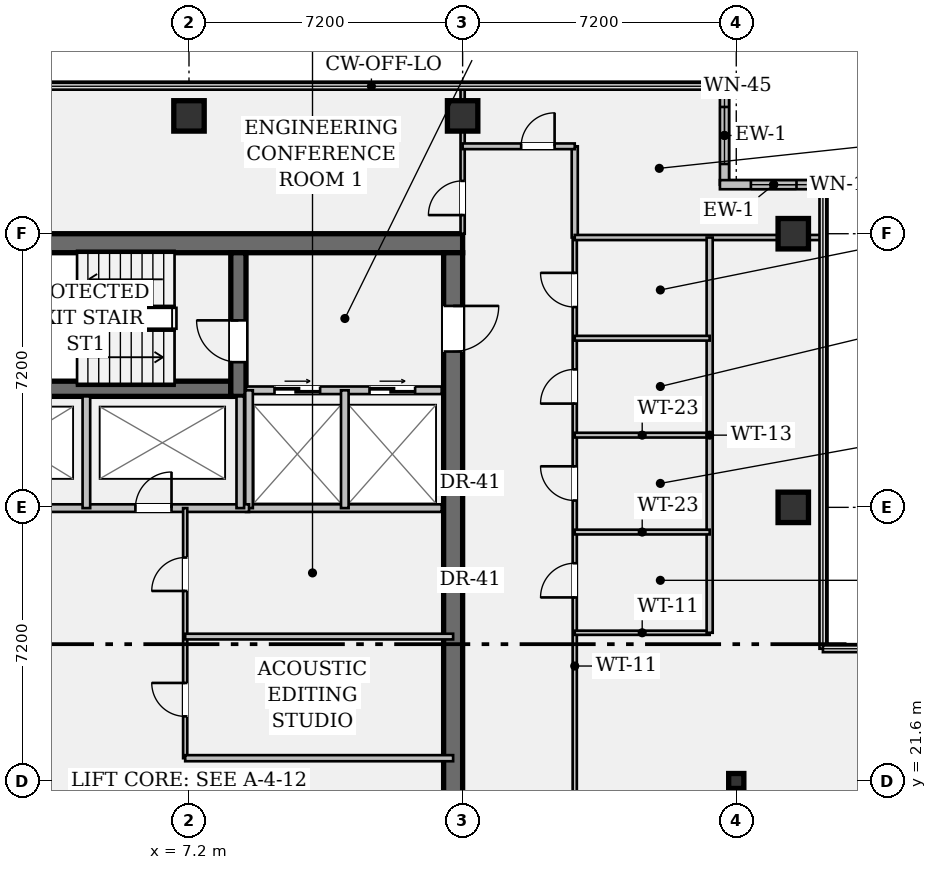
"""IFC4 building model, lengths in metres.
Left out: names, types, materials, properties, quantities, classifications, styles, units other than length and angle.
Written with IfcOpenShell. Run it as: python <this file> out.ifc"""

import sys

from ifc_helpers import new_model, si_unit, direction, frame, frame_2d, origin, origin_2d, place, context, subcontext, project, spatial, rectangle, hollow_rectangle, i_section, extrude, element, fill, save


model = new_model("IFC4")
c1 = context("Model", 3, precision=1e-05, world=origin(), true_north=direction((0.0, 1.0)))
c2 = subcontext(c1, "Body", "Model", "MODEL_VIEW")
j1 = project(units=[si_unit("LENGTHUNIT", "METRE"), si_unit("PLANEANGLEUNIT", "RADIAN")], contexts=[c1])
p1 = place(None, origin())
s1 = spatial("IfcSite", under=j1, at=p1, CompositionType="ELEMENT")
p2 = place(p1, origin())
s2 = spatial("IfcBuilding", under=s1, at=p2, CompositionType="ELEMENT")
p3 = place(p2, frame((0.0, 0.0, 197.75)))
s3 = spatial("IfcBuildingStorey", under=s2, at=p3, CompositionType="ELEMENT", Elevation=197.75)
p4 = place(p3, frame((0.5, 35.75, 0.0), z_axis=(0.0, 0.0, 1.0), x_axis=(1.0, 0.0, 0.0)))
e1 = element("IfcWall", 1, at=p4, inside=s3, PredefinedType="SHEAR", context=c2, shape_type="SweptSolid", body=[
    extrude(rectangle(XDim=13.9, YDim=0.5, at=frame_2d((6.95, 0.0))), origin(), (0.0, 0.0, 1.0), 3.24),
])
p5 = place(p3, frame((14.15, 35.5, 0.0), z_axis=(0.0, 0.0, 1.0), x_axis=(0.0, -1.0, 0.0)))
e2 = element("IfcWall", 2, at=p5, inside=s3, PredefinedType="SHEAR", context=c2, shape_type="SweptSolid", body=[
    extrude(rectangle(XDim=27.8, YDim=0.5, at=frame_2d((13.9, 0.0))), origin(), (0.0, 0.0, 1.0), 3.24),
])
p6 = place(p5, frame((1.4, 0.0, 0.0)))
e3 = element("IfcOpeningElement", 3, at=p6, cuts=e2, PredefinedType="OPENING", context=c2, shape_type="SweptSolid", body=[
    extrude(rectangle(XDim=1.2, YDim=2.15, at=frame_2d((0.6, 1.075))), frame((0.0, 0.262, 0.0), z_axis=(0.0, -1.0, 0.0), x_axis=(1.0, 0.0, 0.0)), (0.0, 0.0, 1.0), 0.524),
])
p7 = place(p5, frame((25.35, 0.0, 0.0)))
e4 = element("IfcOpeningElement", 4, at=p7, cuts=e2, PredefinedType="OPENING", context=c2, shape_type="SweptSolid", body=[
    extrude(rectangle(XDim=1.2, YDim=2.15, at=frame_2d((0.6, 1.075))), frame((0.0, 0.262, 0.0), z_axis=(0.0, -1.0, 0.0), x_axis=(1.0, 0.0, 0.0)), (0.0, 0.0, 1.0), 0.524),
])
p8 = place(p5, frame((14.7, 0.0, 0.0)))
e5 = element("IfcOpeningElement", 5, at=p8, cuts=e2, PredefinedType="OPENING", context=c2, shape_type="SweptSolid", body=[
    extrude(rectangle(XDim=1.6, YDim=2.2, at=frame_2d((0.8, 1.1))), frame((0.0, 0.262, 0.0), z_axis=(0.0, -1.0, 0.0), x_axis=(1.0, 0.0, 0.0)), (0.0, 0.0, 1.0), 0.524),
])
p9 = place(p3, frame((0.5, 31.92, 0.0), z_axis=(0.0, 0.0, 1.0), x_axis=(1.0, 0.0, 0.0)))
e6 = element("IfcWall", 6, at=p9, inside=s3, PredefinedType="SHEAR", context=c2, shape_type="SweptSolid", body=[
    extrude(rectangle(XDim=7.8, YDim=0.4, at=frame_2d((3.9, 0.0))), origin(), (0.0, 0.0, 1.0), 3.24),
])
p10 = place(p3, frame((8.5, 31.72, 0.0), z_axis=(0.0, 0.0, 1.0), x_axis=(0.0, 1.0, 0.0)))
e7 = element("IfcWall", 7, at=p10, inside=s3, PredefinedType="SHEAR", context=c2, shape_type="SweptSolid", body=[
    extrude(rectangle(XDim=3.78, YDim=0.4, at=frame_2d((1.89, 0.0))), origin(), (0.0, 0.0, 1.0), 3.24),
])
p11 = place(p10, frame((0.9, 0.0, 0.0)))
e8 = element("IfcOpeningElement", 8, at=p11, cuts=e7, PredefinedType="OPENING", context=c2, shape_type="SweptSolid", body=[
    extrude(rectangle(XDim=1.1, YDim=2.15, at=frame_2d((0.55, 1.075))), frame((0.0, 0.212, 0.0), z_axis=(0.0, -1.0, 0.0), x_axis=(1.0, 0.0, 0.0)), (0.0, 0.0, 1.0), 0.424),
])
for number, where, z_axis, x_axis in (
    (9, (7.2, 39.1, 0.0), (0.0, 0.0, 1.0), (1.0, 0.0, 0.0)),
    (10, (14.4, 39.1, 0.0), (0.0, 0.0, 1.0), (1.0, 0.0, 0.0)),
):
    element("IfcColumn", number, at=place(p3, frame(where, z_axis=z_axis, x_axis=x_axis)), inside=s3, PredefinedType="COLUMN", context=c2, shape_type="SweptSolid", body=[
        extrude(hollow_rectangle(XDim=0.8, YDim=0.8, WallThickness=0.05, at=origin_2d()), origin(), (0.0, 0.0, 1.0), 3.24),
    ])
p12 = place(p3, frame((21.6, 21.6, 0.0), z_axis=(0.0, 0.0, 1.0), x_axis=(1.0, 0.0, 0.0)))
e11 = element("IfcColumn", 11, at=p12, inside=s3, PredefinedType="COLUMN", context=c2, shape_type="SweptSolid", body=[
    extrude(i_section(OverallWidth=0.399, OverallDepth=0.394, WebThickness=0.023, FlangeThickness=0.037, FilletRadius=0.018, at=origin_2d()), origin(), (0.0, 0.0, 1.0), 3.24),
])
for number, where, z_axis, x_axis in (
    (12, (23.1, 28.8, 0.0), (0.0, 0.0, 1.0), (1.0, 0.0, 0.0)),
    (13, (23.1, 36.0, 0.0), (0.0, 0.0, 1.0), (1.0, 0.0, 0.0)),
):
    element("IfcColumn", number, at=place(p3, frame(where, z_axis=z_axis, x_axis=x_axis)), inside=s3, PredefinedType="COLUMN", context=c2, shape_type="SweptSolid", body=[
        extrude(hollow_rectangle(XDim=0.8, YDim=0.8, WallThickness=0.05, at=origin_2d()), origin(), (0.0, 0.0, 1.0), 3.24),
    ])
p13 = place(p3, frame((21.29, 39.88, 0.0), z_axis=(0.0, 0.0, 1.0), x_axis=(0.0, -1.0, 0.0)))
e14 = element("IfcWall", 14, at=p13, inside=s3, PredefinedType="STANDARD", context=c2, shape_type="SweptSolid", body=[
    extrude(rectangle(XDim=2.59, YDim=0.24, at=frame_2d((1.295, 0.0))), origin(), (0.0, 0.0, 1.0), 3.24),
])
p14 = place(p13, frame((0.545, 0.0, 0.95)))
e15 = element("IfcOpeningElement", 15, at=p14, cuts=e14, PredefinedType="OPENING", context=c2, shape_type="SweptSolid", body=[
    extrude(rectangle(XDim=1.5, YDim=1.8, at=frame_2d((0.75, 0.9))), frame((0.0, 0.132, 0.0), z_axis=(0.0, -1.0, 0.0), x_axis=(1.0, 0.0, 0.0)), (0.0, 0.0, 1.0), 0.264),
])
p15 = place(p3, frame((21.17, 37.29, 0.0), z_axis=(0.0, 0.0, 1.0), x_axis=(1.0, 0.0, 0.0)))
e16 = element("IfcWall", 16, at=p15, inside=s3, PredefinedType="STANDARD", context=c2, shape_type="SweptSolid", body=[
    extrude(rectangle(XDim=2.83, YDim=0.24, at=frame_2d((1.415, 0.0))), origin(), (0.0, 0.0, 1.0), 3.24),
])
p16 = place(p15, frame((0.815, 0.0, 0.95)))
e17 = element("IfcOpeningElement", 17, at=p16, cuts=e16, PredefinedType="OPENING", context=c2, shape_type="SweptSolid", body=[
    extrude(rectangle(XDim=1.2, YDim=1.8, at=frame_2d((0.6, 0.9))), frame((0.0, 0.132, 0.0), z_axis=(0.0, -1.0, 0.0), x_axis=(1.0, 0.0, 0.0)), (0.0, 0.0, 1.0), 0.264),
])
p17 = place(p3, frame((8.7, 31.88, 0.0), z_axis=(0.0, 0.0, 1.0), x_axis=(1.0, 0.0, 0.0)))
e18 = element("IfcWall", 18, at=p17, inside=s3, PredefinedType="PARTITIONING", context=c2, shape_type="SweptSolid", body=[
    extrude(rectangle(XDim=5.15, YDim=0.2, at=frame_2d((2.575, 0.0))), origin(), (0.0, 0.0, 1.0), 3.24),
])
p18 = place(p17, frame((0.75, 0.0, 0.0)))
e19 = element("IfcOpeningElement", 19, at=p18, cuts=e18, PredefinedType="OPENING", context=c2, shape_type="SweptSolid", body=[
    extrude(rectangle(XDim=1.2, YDim=2.2, at=frame_2d((0.6, 1.1))), frame((0.0, 0.112, 0.0), z_axis=(0.0, -1.0, 0.0), x_axis=(1.0, 0.0, 0.0)), (0.0, 0.0, 1.0), 0.224),
])
p19 = place(p17, frame((3.25, 0.0, 0.0)))
e20 = element("IfcOpeningElement", 20, at=p19, cuts=e18, PredefinedType="OPENING", context=c2, shape_type="SweptSolid", body=[
    extrude(rectangle(XDim=1.2, YDim=2.2, at=frame_2d((0.6, 1.1))), frame((0.0, 0.112, 0.0), z_axis=(0.0, -1.0, 0.0), x_axis=(1.0, 0.0, 0.0)), (0.0, 0.0, 1.0), 0.224),
])
p20 = place(p3, frame((8.7, 28.78, 0.0), z_axis=(0.0, 0.0, 1.0), x_axis=(1.0, 0.0, 0.0)))
e21 = element("IfcWall", 21, at=p20, inside=s3, PredefinedType="PARTITIONING", context=c2, shape_type="SweptSolid", body=[
    extrude(rectangle(XDim=5.15, YDim=0.2, at=frame_2d((2.575, 0.0))), origin(), (0.0, 0.0, 1.0), 3.24),
])
for number, where, z_axis, x_axis in (
    (22, (8.78, 28.78, 0.0), (0.0, 0.0, 1.0), (0.0, 1.0, 0.0)),
    (23, (11.3, 28.78, 0.0), (0.0, 0.0, 1.0), (0.0, 1.0, 0.0)),
):
    element("IfcWall", number, at=place(p3, frame(where, z_axis=z_axis, x_axis=x_axis)), inside=s3, PredefinedType="PARTITIONING", context=c2, shape_type="SweptSolid", body=[
        extrude(rectangle(XDim=3.1, YDim=0.2, at=frame_2d((1.55, 0.0))), origin(), (0.0, 0.0, 1.0), 3.24),
    ])
p21 = place(p3, frame((0.6, 28.78, 0.0), z_axis=(0.0, 0.0, 1.0), x_axis=(1.0, 0.0, 0.0)))
e24 = element("IfcWall", 24, at=p21, inside=s3, PredefinedType="PARTITIONING", context=c2, shape_type="SweptSolid", body=[
    extrude(rectangle(XDim=8.18, YDim=0.2, at=frame_2d((4.09, 0.0))), origin(), (0.0, 0.0, 1.0), 3.24),
])
p22 = place(p21, frame((1.21, 0.0, 0.0)))
e25 = element("IfcOpeningElement", 25, at=p22, cuts=e24, PredefinedType="OPENING", context=c2, shape_type="SweptSolid", body=[
    extrude(rectangle(XDim=0.95, YDim=2.15, at=frame_2d((0.475, 1.075))), frame((0.0, 0.112, 0.0), z_axis=(0.0, -1.0, 0.0), x_axis=(1.0, 0.0, 0.0)), (0.0, 0.0, 1.0), 0.224),
])
p23 = place(p21, frame((5.19, 0.0, 0.0)))
e26 = element("IfcOpeningElement", 26, at=p23, cuts=e24, PredefinedType="OPENING", context=c2, shape_type="SweptSolid", body=[
    extrude(rectangle(XDim=0.95, YDim=2.15, at=frame_2d((0.475, 1.075))), frame((0.0, 0.112, 0.0), z_axis=(0.0, -1.0, 0.0), x_axis=(1.0, 0.0, 0.0)), (0.0, 0.0, 1.0), 0.224),
])
for number, where, z_axis, x_axis in (
    (27, (4.5, 28.78, 0.0), (0.0, 0.0, 1.0), (0.0, 1.0, 0.0)),
    (28, (8.55, 28.78, 0.0), (0.0, 0.0, 1.0), (0.0, 1.0, 0.0)),
):
    element("IfcWall", number, at=place(p3, frame(where, z_axis=z_axis, x_axis=x_axis)), inside=s3, PredefinedType="PARTITIONING", context=c2, shape_type="SweptSolid", body=[
        extrude(rectangle(XDim=2.94, YDim=0.2, at=frame_2d((1.47, 0.0))), origin(), (0.0, 0.0, 1.0), 3.24),
    ])
p24 = place(p3, frame((7.1, 22.2, 0.0), z_axis=(0.0, 0.0, 1.0), x_axis=(0.0, 1.0, 0.0)))
e29 = element("IfcWall", 29, at=p24, inside=s3, PredefinedType="PARTITIONING", context=c2, shape_type="SweptSolid", body=[
    extrude(rectangle(XDim=6.58, YDim=0.11, at=frame_2d((3.29, 0.0))), origin(), (0.0, 0.0, 1.0), 3.24),
])
p25 = place(p24, frame((1.1, 0.0, 0.0)))
e30 = element("IfcOpeningElement", 30, at=p25, cuts=e29, PredefinedType="OPENING", context=c2, shape_type="SweptSolid", body=[
    extrude(rectangle(XDim=0.88, YDim=2.15, at=frame_2d((0.44, 1.075))), frame((0.0, 0.067, 0.0), z_axis=(0.0, -1.0, 0.0), x_axis=(1.0, 0.0, 0.0)), (0.0, 0.0, 1.0), 0.134),
])
p26 = place(p24, frame((4.4, 0.0, 0.0)))
e31 = element("IfcOpeningElement", 31, at=p26, cuts=e29, PredefinedType="OPENING", context=c2, shape_type="SweptSolid", body=[
    extrude(rectangle(XDim=0.88, YDim=2.15, at=frame_2d((0.44, 1.075))), frame((0.0, 0.067, 0.0), z_axis=(0.0, -1.0, 0.0), x_axis=(1.0, 0.0, 0.0)), (0.0, 0.0, 1.0), 0.134),
])
p27 = place(p3, frame((7.1, 22.2, 0.0), z_axis=(0.0, 0.0, 1.0), x_axis=(1.0, 0.0, 0.0)))
e32 = element("IfcWall", 32, at=p27, inside=s3, PredefinedType="PARTITIONING", context=c2, shape_type="SweptSolid", body=[
    extrude(rectangle(XDim=7.05, YDim=0.16, at=frame_2d((3.525, 0.0))), origin(), (0.0, 0.0, 1.0), 3.24),
])
p28 = place(p3, frame((7.1, 25.4, 0.0), z_axis=(0.0, 0.0, 1.0), x_axis=(1.0, 0.0, 0.0)))
e33 = element("IfcWall", 33, at=p28, inside=s3, PredefinedType="PARTITIONING", context=c2, shape_type="SweptSolid", body=[
    extrude(rectangle(XDim=7.05, YDim=0.15, at=frame_2d((3.525, 0.0))), origin(), (0.0, 0.0, 1.0), 3.24),
])
p29 = place(p3, frame((17.35, 13.35, 0.0), z_axis=(0.0, 0.0, 1.0), x_axis=(0.0, 1.0, 0.0)))
e34 = element("IfcWall", 34, at=p29, inside=s3, PredefinedType="PARTITIONING", context=c2, shape_type="SweptSolid", body=[
    extrude(rectangle(XDim=22.55, YDim=0.11, at=frame_2d((11.275, 0.0))), origin(), (0.0, 0.0, 1.0), 2.613),
])
p30 = place(p29, frame((13.08, 0.0, 0.0)))
e35 = element("IfcOpeningElement", 35, at=p30, cuts=e34, PredefinedType="OPENING", context=c2, shape_type="SweptSolid", body=[
    extrude(rectangle(XDim=0.9, YDim=2.15, at=frame_2d((0.45, 1.075))), frame((0.0, 0.067, 0.0), z_axis=(0.0, -1.0, 0.0), x_axis=(1.0, 0.0, 0.0)), (0.0, 0.0, 1.0), 0.134),
])
p31 = place(p29, frame((15.63, 0.0, 0.0)))
e36 = element("IfcOpeningElement", 36, at=p31, cuts=e34, PredefinedType="OPENING", context=c2, shape_type="SweptSolid", body=[
    extrude(rectangle(XDim=0.9, YDim=2.15, at=frame_2d((0.45, 1.075))), frame((0.0, 0.067, 0.0), z_axis=(0.0, -1.0, 0.0), x_axis=(1.0, 0.0, 0.0)), (0.0, 0.0, 1.0), 0.134),
])
p32 = place(p29, frame((18.18, 0.0, 0.0)))
e37 = element("IfcOpeningElement", 37, at=p32, cuts=e34, PredefinedType="OPENING", context=c2, shape_type="SweptSolid", body=[
    extrude(rectangle(XDim=0.9, YDim=2.15, at=frame_2d((0.45, 1.075))), frame((0.0, 0.067, 0.0), z_axis=(0.0, -1.0, 0.0), x_axis=(1.0, 0.0, 0.0)), (0.0, 0.0, 1.0), 0.134),
])
p33 = place(p29, frame((20.72, 0.0, 0.0)))
e38 = element("IfcOpeningElement", 38, at=p33, cuts=e34, PredefinedType="OPENING", context=c2, shape_type="SweptSolid", body=[
    extrude(rectangle(XDim=0.9, YDim=2.15, at=frame_2d((0.45, 1.075))), frame((0.0, 0.067, 0.0), z_axis=(0.0, -1.0, 0.0), x_axis=(1.0, 0.0, 0.0)), (0.0, 0.0, 1.0), 0.134),
])
p34 = place(p3, frame((14.4, 36.0, 0.0), z_axis=(0.0, 0.0, 1.0), x_axis=(0.0, 1.0, 0.0)))
e39 = element("IfcWall", 39, at=p34, inside=s3, PredefinedType="PARTITIONING", context=c2, shape_type="SweptSolid", body=[
    extrude(rectangle(XDim=3.88, YDim=0.11, at=frame_2d((1.94, 0.0))), origin(), (0.0, 0.0, 1.0), 2.613),
])
p35 = place(p34, frame((0.49, 0.0, 0.0)))
e40 = element("IfcOpeningElement", 40, at=p35, cuts=e39, PredefinedType="OPENING", context=c2, shape_type="SweptSolid", body=[
    extrude(rectangle(XDim=0.9, YDim=2.15, at=frame_2d((0.45, 1.075))), frame((0.0, 0.067, 0.0), z_axis=(0.0, -1.0, 0.0), x_axis=(1.0, 0.0, 0.0)), (0.0, 0.0, 1.0), 0.134),
])
p36 = place(p3, frame((17.35, 35.9, 0.0), z_axis=(0.0, 0.0, 1.0), x_axis=(0.0, 1.0, 0.0)))
e41 = element("IfcWall", 41, at=p36, inside=s3, PredefinedType="PARTITIONING", context=c2, shape_type="SweptSolid", body=[
    extrude(rectangle(XDim=2.4, YDim=0.16, at=frame_2d((1.2, 0.0))), origin(), (0.0, 0.0, 1.0), 2.613),
])
p37 = place(p3, frame((14.4, 38.3, 0.0), z_axis=(0.0, 0.0, 1.0), x_axis=(1.0, 0.0, 0.0)))
e42 = element("IfcWall", 42, at=p37, inside=s3, PredefinedType="PARTITIONING", context=c2, shape_type="SweptSolid", body=[
    extrude(rectangle(XDim=2.95, YDim=0.15, at=frame_2d((1.475, 0.0))), origin(), (0.0, 0.0, 1.0), 3.24),
])
p38 = place(p37, frame((1.54, 0.0, 0.0)))
e43 = element("IfcOpeningElement", 43, at=p38, cuts=e42, PredefinedType="OPENING", context=c2, shape_type="SweptSolid", body=[
    extrude(rectangle(XDim=0.88, YDim=2.15, at=frame_2d((0.44, 1.075))), frame((0.0, 0.087, 0.0), z_axis=(0.0, -1.0, 0.0), x_axis=(1.0, 0.0, 0.0)), (0.0, 0.0, 1.0), 0.174),
])
p39 = place(p3, frame((17.35, 35.9, 0.0), z_axis=(0.0, 0.0, 1.0), x_axis=(1.0, 0.0, 0.0)))
e44 = element("IfcWall", 44, at=p39, inside=s3, PredefinedType="PARTITIONING", context=c2, shape_type="SweptSolid", body=[
    extrude(rectangle(XDim=6.53, YDim=0.135, at=frame_2d((3.265, 0.0))), origin(), (0.0, 0.0, 1.0), 2.613),
])
p40 = place(p3, frame((17.35, 25.5, 0.0), z_axis=(0.0, 0.0, 1.0), x_axis=(1.0, 0.0, 0.0)))
e45 = element("IfcWall", 45, at=p40, inside=s3, PredefinedType="PARTITIONING", context=c2, shape_type="SweptSolid", body=[
    extrude(rectangle(XDim=3.55, YDim=0.11, at=frame_2d((1.775, 0.0))), origin(), (0.0, 0.0, 1.0), 2.808),
])
p41 = place(p3, frame((20.9, 25.5, 0.0), z_axis=(0.0, 0.0, 1.0), x_axis=(0.0, 1.0, 0.0)))
e46 = element("IfcWall", 46, at=p41, inside=s3, PredefinedType="PARTITIONING", context=c2, shape_type="SweptSolid", body=[
    extrude(rectangle(XDim=10.4, YDim=0.16, at=frame_2d((5.2, 0.0))), origin(), (0.0, 0.0, 1.0), 2.613),
])
for number, where, z_axis, x_axis in (
    (47, (17.35, 28.15, 0.0), (0.0, 0.0, 1.0), (1.0, 0.0, 0.0)),
    (48, (17.35, 30.7, 0.0), (0.0, 0.0, 1.0), (1.0, 0.0, 0.0)),
    (49, (17.35, 33.25, 0.0), (0.0, 0.0, 1.0), (1.0, 0.0, 0.0)),
):
    element("IfcWall", number, at=place(p3, frame(where, z_axis=z_axis, x_axis=x_axis)), inside=s3, PredefinedType="PARTITIONING", context=c2, shape_type="SweptSolid", body=[
        extrude(rectangle(XDim=3.55, YDim=0.125, at=frame_2d((1.775, 0.0))), origin(), (0.0, 0.0, 1.0), 2.808),
    ])
p42 = place(p14, origin())
e50 = element("IfcWindow", 50, at=p42, inside=s3, PartitioningType="SINGLE_PANEL", PredefinedType="WINDOW", context=c2, shape_type="SweptSolid", body=[
    extrude(rectangle(XDim=1.5, YDim=1.8, at=frame_2d((0.75, 0.9))), frame((0.0, 0.03, 0.0), z_axis=(0.0, -1.0, 0.0), x_axis=(1.0, 0.0, 0.0)), (0.0, 0.0, 1.0), 0.06),
])
fill(e15, e50)
p43 = place(p16, origin())
e51 = element("IfcWindow", 51, at=p43, inside=s3, PartitioningType="SINGLE_PANEL", PredefinedType="WINDOW", context=c2, shape_type="SweptSolid", body=[
    extrude(rectangle(XDim=1.2, YDim=1.8, at=frame_2d((0.6, 0.9))), frame((0.0, 0.03, 0.0), z_axis=(0.0, -1.0, 0.0), x_axis=(1.0, 0.0, 0.0)), (0.0, 0.0, 1.0), 0.06),
])
fill(e17, e51)
p44 = place(p11, origin())
e52 = element("IfcDoor", 52, at=p44, inside=s3, OperationType="SINGLE_SWING_RIGHT", PredefinedType="DOOR", context=c2, shape_type="SweptSolid", body=[
    extrude(rectangle(XDim=1.1, YDim=2.15, at=frame_2d((0.55, 1.075))), frame((0.0, 0.025, 0.0), z_axis=(0.0, -1.0, 0.0), x_axis=(1.0, 0.0, 0.0)), (0.0, 0.0, 1.0), 0.05),
])
fill(e8, e52)
p45 = place(p6, origin())
e53 = element("IfcDoor", 53, at=p45, inside=s3, OperationType="SINGLE_SWING_LEFT", PredefinedType="DOOR", context=c2, shape_type="SweptSolid", body=[
    extrude(rectangle(XDim=1.2, YDim=2.15, at=frame_2d((0.6, 1.075))), frame((0.0, 0.025, 0.0), z_axis=(0.0, -1.0, 0.0), x_axis=(1.0, 0.0, 0.0)), (0.0, 0.0, 1.0), 0.05),
])
fill(e3, e53)
p46 = place(p18, origin())
e54 = element("IfcDoor", 54, at=p46, inside=s3, OperationType="DOUBLE_DOOR_SLIDING", PredefinedType="DOOR", context=c2, shape_type="SweptSolid", body=[
    extrude(rectangle(XDim=1.2, YDim=2.2, at=frame_2d((0.6, 1.1))), frame((0.0, 0.025, 0.0), z_axis=(0.0, -1.0, 0.0), x_axis=(1.0, 0.0, 0.0)), (0.0, 0.0, 1.0), 0.05),
])
fill(e19, e54)
p47 = place(p19, origin())
e55 = element("IfcDoor", 55, at=p47, inside=s3, OperationType="DOUBLE_DOOR_SLIDING", PredefinedType="DOOR", context=c2, shape_type="SweptSolid", body=[
    extrude(rectangle(XDim=1.2, YDim=2.2, at=frame_2d((0.6, 1.1))), frame((0.0, 0.025, 0.0), z_axis=(0.0, -1.0, 0.0), x_axis=(1.0, 0.0, 0.0)), (0.0, 0.0, 1.0), 0.05),
])
fill(e20, e55)
p48 = place(p23, origin())
e56 = element("IfcDoor", 56, at=p48, inside=s3, OperationType="SINGLE_SWING_RIGHT", PredefinedType="DOOR", context=c2, shape_type="SweptSolid", body=[
    extrude(rectangle(XDim=0.95, YDim=2.15, at=frame_2d((0.475, 1.075))), frame((0.0, 0.025, 0.0), z_axis=(0.0, -1.0, 0.0), x_axis=(1.0, 0.0, 0.0)), (0.0, 0.0, 1.0), 0.05),
])
fill(e26, e56)
p49 = place(p25, origin())
e57 = element("IfcDoor", 57, at=p49, inside=s3, OperationType="SINGLE_SWING_RIGHT", PredefinedType="DOOR", context=c2, shape_type="SweptSolid", body=[
    extrude(rectangle(XDim=0.88, YDim=2.15, at=frame_2d((0.44, 1.075))), frame((0.0, 0.025, 0.0), z_axis=(0.0, -1.0, 0.0), x_axis=(1.0, 0.0, 0.0)), (0.0, 0.0, 1.0), 0.05),
])
fill(e30, e57)
p50 = place(p26, origin())
e58 = element("IfcDoor", 58, at=p50, inside=s3, OperationType="SINGLE_SWING_LEFT", PredefinedType="DOOR", context=c2, shape_type="SweptSolid", body=[
    extrude(rectangle(XDim=0.88, YDim=2.15, at=frame_2d((0.44, 1.075))), frame((0.0, 0.025, 0.0), z_axis=(0.0, -1.0, 0.0), x_axis=(1.0, 0.0, 0.0)), (0.0, 0.0, 1.0), 0.05),
])
fill(e31, e58)
p51 = place(p35, origin())
e59 = element("IfcDoor", 59, at=p51, inside=s3, OperationType="SINGLE_SWING_LEFT", PredefinedType="DOOR", context=c2, shape_type="SweptSolid", body=[
    extrude(rectangle(XDim=0.9, YDim=2.15, at=frame_2d((0.45, 1.075))), frame((0.0, 0.025, 0.0), z_axis=(0.0, -1.0, 0.0), x_axis=(1.0, 0.0, 0.0)), (0.0, 0.0, 1.0), 0.05),
])
fill(e40, e59)
p52 = place(p38, origin())
e60 = element("IfcDoor", 60, at=p52, inside=s3, OperationType="SINGLE_SWING_RIGHT", PredefinedType="DOOR", context=c2, shape_type="SweptSolid", body=[
    extrude(rectangle(XDim=0.88, YDim=2.15, at=frame_2d((0.44, 1.075))), frame((0.0, 0.025, 0.0), z_axis=(0.0, -1.0, 0.0), x_axis=(1.0, 0.0, 0.0)), (0.0, 0.0, 1.0), 0.05),
])
fill(e43, e60)
p53 = place(p30, origin())
e61 = element("IfcDoor", 61, at=p53, inside=s3, OperationType="SINGLE_SWING_LEFT", PredefinedType="DOOR", context=c2, shape_type="SweptSolid", body=[
    extrude(rectangle(XDim=0.9, YDim=2.15, at=frame_2d((0.45, 1.075))), frame((0.0, 0.025, 0.0), z_axis=(0.0, -1.0, 0.0), x_axis=(1.0, 0.0, 0.0)), (0.0, 0.0, 1.0), 0.05),
])
fill(e35, e61)
p54 = place(p31, origin())
e62 = element("IfcDoor", 62, at=p54, inside=s3, OperationType="SINGLE_SWING_RIGHT", PredefinedType="DOOR", context=c2, shape_type="SweptSolid", body=[
    extrude(rectangle(XDim=0.9, YDim=2.15, at=frame_2d((0.45, 1.075))), frame((0.0, 0.025, 0.0), z_axis=(0.0, -1.0, 0.0), x_axis=(1.0, 0.0, 0.0)), (0.0, 0.0, 1.0), 0.05),
])
fill(e36, e62)
p55 = place(p32, origin())
e63 = element("IfcDoor", 63, at=p55, inside=s3, OperationType="SINGLE_SWING_LEFT", PredefinedType="DOOR", context=c2, shape_type="SweptSolid", body=[
    extrude(rectangle(XDim=0.9, YDim=2.15, at=frame_2d((0.45, 1.075))), frame((0.0, 0.025, 0.0), z_axis=(0.0, -1.0, 0.0), x_axis=(1.0, 0.0, 0.0)), (0.0, 0.0, 1.0), 0.05),
])
fill(e37, e63)
p56 = place(p33, origin())
e64 = element("IfcDoor", 64, at=p56, inside=s3, OperationType="SINGLE_SWING_RIGHT", PredefinedType="DOOR", context=c2, shape_type="SweptSolid", body=[
    extrude(rectangle(XDim=0.9, YDim=2.15, at=frame_2d((0.45, 1.075))), frame((0.0, 0.025, 0.0), z_axis=(0.0, -1.0, 0.0), x_axis=(1.0, 0.0, 0.0)), (0.0, 0.0, 1.0), 0.05),
])
fill(e38, e64)
save(model, sys.argv[1])
